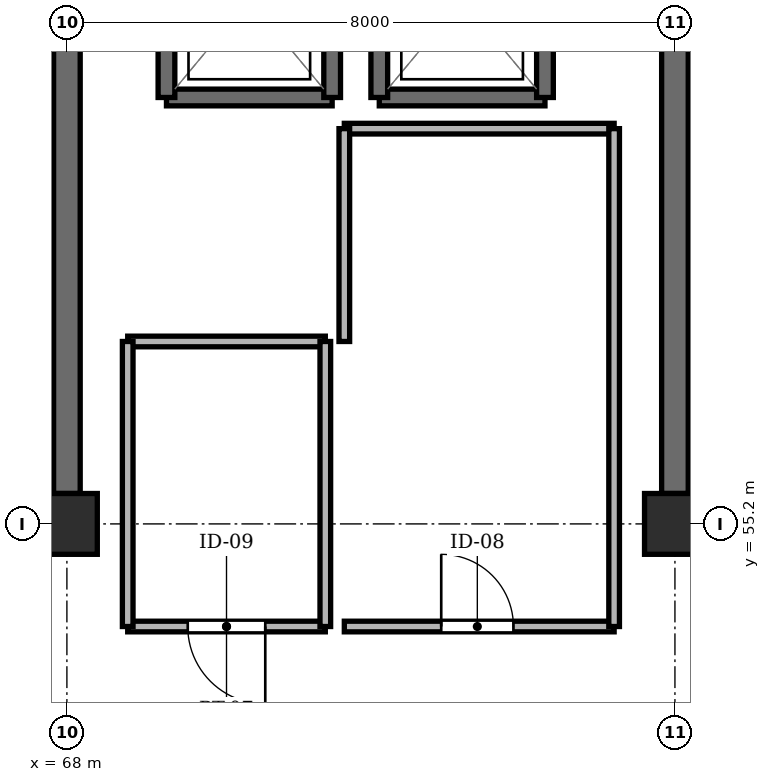
"""IFC4 building model, lengths in metres.
Left out: names, types, materials, properties, quantities, classifications, styles, units other than length and angle.
Written with IfcOpenShell. Run it as: python <this file> out.ifc"""

import sys

from ifc_helpers import new_model, si_unit, direction, frame, frame_2d, origin, origin_2d, place, context, subcontext, project, spatial, rectangle, extrude, element, fill, save


model = new_model("IFC4")
c1 = context("Model", 3, precision=1e-05, world=origin(), true_north=direction((0.0, 1.0)))
c2 = subcontext(c1, "Body", "Model", "MODEL_VIEW")
j1 = project(units=[si_unit("LENGTHUNIT", "METRE"), si_unit("PLANEANGLEUNIT", "RADIAN")], contexts=[c1])
p1 = place(None, origin())
s1 = spatial("IfcSite", under=j1, at=p1, CompositionType="ELEMENT")
p2 = place(p1, origin())
s2 = spatial("IfcBuilding", under=s1, at=p2, CompositionType="ELEMENT")
p3 = place(p2, frame((0.0, 0.0, 60.05)))
s3 = spatial("IfcBuildingStorey", under=s2, at=p3, CompositionType="ELEMENT", Elevation=60.05)
for number, where, z_axis, x_axis in (
    (1, (68.0, 55.2, -0.21), (0.0, 0.0, 1.0), (1.0, 0.0, 0.0)),
    (2, (76.0, 55.2, -0.21), (0.0, 0.0, 1.0), (1.0, 0.0, 0.0)),
):
    element("IfcColumn", number, at=place(p3, frame(where, z_axis=z_axis, x_axis=x_axis)), inside=s3, PredefinedType="COLUMN", context=c2, shape_type="SweptSolid", body=[
        extrude(rectangle(XDim=0.8, YDim=0.8, at=origin_2d()), origin(), (0.0, 0.0, 1.0), 3.25),
    ])
for number, where, z_axis, x_axis in (
    (3, (68.0, 55.6, 0.0), (0.0, 0.0, 1.0), (0.0, 1.0, 0.0)),
    (4, (76.0, 55.6, 0.0), (0.0, 0.0, 1.0), (0.0, 1.0, 0.0)),
):
    element("IfcWall", number, at=place(p3, frame(where, z_axis=z_axis, x_axis=x_axis)), inside=s3, PredefinedType="SHEAR", context=c2, shape_type="SweptSolid", body=[
        extrude(rectangle(XDim=6.45, YDim=0.35, at=frame_2d((3.225, 0.0))), origin(), (0.0, 0.0, 1.0), 3.04),
    ])
p4 = place(p3, frame((69.31, 60.81, 0.0), z_axis=(0.0, 0.0, 1.0), x_axis=(1.0, 0.0, 0.0)))
e5 = element("IfcWall", 5, at=p4, inside=s3, PredefinedType="SHEAR", context=c2, shape_type="SweptSolid", body=[
    extrude(rectangle(XDim=2.18, YDim=0.22, at=frame_2d((1.09, 0.0))), origin(), (0.0, 0.0, 1.0), 3.04),
])
for number, where, z_axis, x_axis in (
    (6, (69.31, 63.39, 0.0), (0.0, 0.0, 1.0), (0.0, -1.0, 0.0)),
    (7, (71.49, 60.81, 0.0), (0.0, 0.0, 1.0), (0.0, 1.0, 0.0)),
):
    element("IfcWall", number, at=place(p3, frame(where, z_axis=z_axis, x_axis=x_axis)), inside=s3, PredefinedType="SHEAR", context=c2, shape_type="SweptSolid", body=[
        extrude(rectangle(XDim=2.58, YDim=0.22, at=frame_2d((1.29, 0.0))), origin(), (0.0, 0.0, 1.0), 3.04),
    ])
p5 = place(p3, frame((72.11, 60.81, 0.0), z_axis=(0.0, 0.0, 1.0), x_axis=(1.0, 0.0, 0.0)))
e8 = element("IfcWall", 8, at=p5, inside=s3, PredefinedType="SHEAR", context=c2, shape_type="SweptSolid", body=[
    extrude(rectangle(XDim=2.18, YDim=0.22, at=frame_2d((1.09, 0.0))), origin(), (0.0, 0.0, 1.0), 3.04),
])
for number, where, z_axis, x_axis in (
    (9, (72.11, 63.39, 0.0), (0.0, 0.0, 1.0), (0.0, -1.0, 0.0)),
    (10, (74.29, 60.81, 0.0), (0.0, 0.0, 1.0), (0.0, 1.0, 0.0)),
):
    element("IfcWall", number, at=place(p3, frame(where, z_axis=z_axis, x_axis=x_axis)), inside=s3, PredefinedType="SHEAR", context=c2, shape_type="SweptSolid", body=[
        extrude(rectangle(XDim=2.58, YDim=0.22, at=frame_2d((1.29, 0.0))), origin(), (0.0, 0.0, 1.0), 3.04),
    ])
p6 = place(p3, frame((68.8, 53.85, 0.0), z_axis=(0.0, 0.0, 1.0), x_axis=(1.0, 0.0, 0.0)))
e11 = element("IfcWall", 11, at=p6, inside=s3, PredefinedType="PARTITIONING", context=c2, shape_type="SweptSolid", body=[
    extrude(rectangle(XDim=2.6, YDim=0.14, at=frame_2d((1.3, 0.0))), origin(), (0.0, 0.0, 1.0), 2.53),
])
p7 = place(p6, frame((0.79, 0.0, 0.0)))
e12 = element("IfcOpeningElement", 12, at=p7, cuts=e11, PredefinedType="OPENING", context=c2, shape_type="SweptSolid", body=[
    extrude(rectangle(XDim=1.02, YDim=2.1, at=frame_2d((0.51, 1.05))), frame((0.0, 0.082, 0.0), z_axis=(0.0, -1.0, 0.0), x_axis=(1.0, 0.0, 0.0)), (0.0, 0.0, 1.0), 0.164),
])
p8 = place(p3, frame((68.8, 57.6, 0.0), z_axis=(0.0, 0.0, 1.0), x_axis=(1.0, 0.0, 0.0)))
e13 = element("IfcWall", 13, at=p8, inside=s3, PredefinedType="PARTITIONING", context=c2, shape_type="SweptSolid", body=[
    extrude(rectangle(XDim=2.6, YDim=0.14, at=frame_2d((1.3, 0.0))), origin(), (0.0, 0.0, 1.0), 2.53),
])
for number, where, z_axis, x_axis in (
    (14, (68.8, 53.85, 0.0), (0.0, 0.0, 1.0), (0.0, 1.0, 0.0)),
    (15, (71.4, 53.85, 0.0), (0.0, 0.0, 1.0), (0.0, 1.0, 0.0)),
):
    element("IfcWall", number, at=place(p3, frame(where, z_axis=z_axis, x_axis=x_axis)), inside=s3, PredefinedType="PARTITIONING", context=c2, shape_type="SweptSolid", body=[
        extrude(rectangle(XDim=3.75, YDim=0.14, at=frame_2d((1.875, 0.0))), origin(), (0.0, 0.0, 1.0), 2.53),
    ])
p9 = place(p3, frame((71.65, 53.85, 0.0), z_axis=(0.0, 0.0, 1.0), x_axis=(1.0, 0.0, 0.0)))
e16 = element("IfcWall", 16, at=p9, inside=s3, PredefinedType="PARTITIONING", context=c2, shape_type="SweptSolid", body=[
    extrude(rectangle(XDim=3.55, YDim=0.14, at=frame_2d((1.775, 0.0))), origin(), (0.0, 0.0, 1.0), 2.53),
])
p10 = place(p9, frame((1.275, 0.0, 0.0)))
e17 = element("IfcOpeningElement", 17, at=p10, cuts=e16, PredefinedType="OPENING", context=c2, shape_type="SweptSolid", body=[
    extrude(rectangle(XDim=0.95, YDim=2.1, at=frame_2d((0.475, 1.05))), frame((0.0, 0.082, 0.0), z_axis=(0.0, -1.0, 0.0), x_axis=(1.0, 0.0, 0.0)), (0.0, 0.0, 1.0), 0.164),
])
p11 = place(p3, frame((71.65, 60.4, 0.0), z_axis=(0.0, 0.0, 1.0), x_axis=(1.0, 0.0, 0.0)))
e18 = element("IfcWall", 18, at=p11, inside=s3, PredefinedType="PARTITIONING", context=c2, shape_type="SweptSolid", body=[
    extrude(rectangle(XDim=3.55, YDim=0.14, at=frame_2d((1.775, 0.0))), origin(), (0.0, 0.0, 1.0), 2.53),
])
p12 = place(p3, frame((71.65, 57.6, 0.0), z_axis=(0.0, 0.0, 1.0), x_axis=(0.0, 1.0, 0.0)))
e19 = element("IfcWall", 19, at=p12, inside=s3, PredefinedType="PARTITIONING", context=c2, shape_type="SweptSolid", body=[
    extrude(rectangle(XDim=2.8, YDim=0.14, at=frame_2d((1.4, 0.0))), origin(), (0.0, 0.0, 1.0), 2.53),
])
p13 = place(p3, frame((75.2, 53.85, 0.0), z_axis=(0.0, 0.0, 1.0), x_axis=(0.0, 1.0, 0.0)))
e20 = element("IfcWall", 20, at=p13, inside=s3, PredefinedType="PARTITIONING", context=c2, shape_type="SweptSolid", body=[
    extrude(rectangle(XDim=6.55, YDim=0.14, at=frame_2d((3.275, 0.0))), origin(), (0.0, 0.0, 1.0), 2.53),
])
p14 = place(p7, frame((1.02, 0.0, 0.0), z_axis=(0.0, 0.0, 1.0), x_axis=(-1.0, 0.0, 0.0)))
e21 = element("IfcDoor", 21, at=p14, inside=s3, OperationType="SINGLE_SWING_RIGHT", PredefinedType="DOOR", context=c2, shape_type="SweptSolid", body=[
    extrude(rectangle(XDim=1.02, YDim=2.1, at=frame_2d((0.51, 1.05))), frame((0.0, 0.025, 0.0), z_axis=(0.0, -1.0, 0.0), x_axis=(1.0, 0.0, 0.0)), (0.0, 0.0, 1.0), 0.05),
])
fill(e12, e21)
p15 = place(p10, origin())
e22 = element("IfcDoor", 22, at=p15, inside=s3, OperationType="SINGLE_SWING_LEFT", PredefinedType="DOOR", context=c2, shape_type="SweptSolid", body=[
    extrude(rectangle(XDim=0.95, YDim=2.1, at=frame_2d((0.475, 1.05))), frame((0.0, 0.025, 0.0), z_axis=(0.0, -1.0, 0.0), x_axis=(1.0, 0.0, 0.0)), (0.0, 0.0, 1.0), 0.05),
])
fill(e17, e22)
save(model, sys.argv[1])
